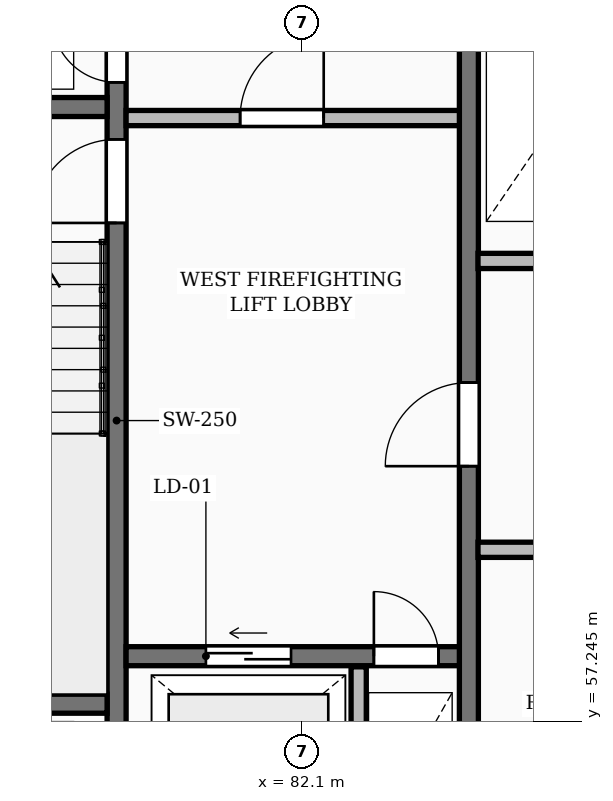
"""IFC4 building model, lengths in metres.
Left out: names, types, materials, properties, quantities, classifications, styles, units other than length and angle.
Written with IfcOpenShell. Run it as: python <this file> out.ifc"""

import sys

from ifc_helpers import new_model, si_unit, direction, frame, frame_2d, origin, place, context, subcontext, project, spatial, rectangle, extrude, element, fill, save


model = new_model("IFC4")
c1 = context("Model", 3, precision=1e-05, world=origin(), true_north=direction((0.0, 1.0)))
c2 = subcontext(c1, "Body", "Model", "MODEL_VIEW")
j1 = project(units=[si_unit("LENGTHUNIT", "METRE"), si_unit("PLANEANGLEUNIT", "RADIAN")], contexts=[c1])
p1 = place(None, origin())
s1 = spatial("IfcSite", under=j1, at=p1, CompositionType="ELEMENT")
p2 = place(p1, origin())
s2 = spatial("IfcBuilding", under=s1, at=p2, CompositionType="ELEMENT")
p3 = place(p2, frame((0.0, 0.0, 139.3)))
s3 = spatial("IfcBuildingStorey", under=s2, at=p3, CompositionType="ELEMENT", Elevation=139.3)
p4 = place(p3, frame((79.665, 55.4, 0.0), z_axis=(0.0, 0.0, 1.0), x_axis=(0.0, 1.0, 0.0)))
e1 = element("IfcWall", 1, at=p4, inside=s3, PredefinedType="SHEAR", context=c2, shape_type="SweptSolid", body=[
    extrude(rectangle(XDim=11.6, YDim=0.25, at=frame_2d((5.8, 0.0))), origin(), (0.0, 0.0, 1.0), 3.6),
])
p5 = place(p4, frame((0.55, 0.0, 0.0)))
e2 = element("IfcOpeningElement", 2, at=p5, cuts=e1, PredefinedType="OPENING", context=c2, shape_type="SweptSolid", body=[
    extrude(rectangle(XDim=0.85, YDim=2.05, at=frame_2d((0.425, 1.025))), frame((0.0, 0.135, 0.0), z_axis=(0.0, -1.0, 0.0), x_axis=(1.0, 0.0, 0.0)), (0.0, 0.0, 1.0), 0.27),
])
p6 = place(p4, frame((8.4, 0.0, 0.0)))
e3 = element("IfcOpeningElement", 3, at=p6, cuts=e1, PredefinedType="OPENING", context=c2, shape_type="SweptSolid", body=[
    extrude(rectangle(XDim=1.1, YDim=2.1, at=frame_2d((0.55, 1.05))), frame((0.0, 0.135, 0.0), z_axis=(0.0, -1.0, 0.0), x_axis=(1.0, 0.0, 0.0)), (0.0, 0.0, 1.0), 0.27),
])
p7 = place(p4, frame((10.25, 0.0, 0.0)))
e4 = element("IfcOpeningElement", 4, at=p7, cuts=e1, PredefinedType="OPENING", context=c2, shape_type="SweptSolid", body=[
    extrude(rectangle(XDim=0.85, YDim=2.05, at=frame_2d((0.425, 1.025))), frame((0.0, 0.135, 0.0), z_axis=(0.0, -1.0, 0.0), x_axis=(1.0, 0.0, 0.0)), (0.0, 0.0, 1.0), 0.27),
])
for number, where, z_axis, x_axis in (
    (5, (76.3, 57.475, 0.0), (0.0, 0.0, 1.0), (1.0, 0.0, 0.0)),
    (6, (76.3, 65.325, 0.0), (0.0, 0.0, 1.0), (1.0, 0.0, 0.0)),
):
    element("IfcWall", number, at=place(p3, frame(where, z_axis=z_axis, x_axis=x_axis)), inside=s3, PredefinedType="SHEAR", context=c2, shape_type="SweptSolid", body=[
        extrude(rectangle(XDim=3.24, YDim=0.25, at=frame_2d((1.62, 0.0))), origin(), (0.0, 0.0, 1.0), 3.6),
    ])
p8 = place(p3, frame((79.79, 58.1, 0.0), z_axis=(0.0, 0.0, 1.0), x_axis=(1.0, 0.0, 0.0)))
e7 = element("IfcWall", 7, at=p8, inside=s3, PredefinedType="SHEAR", context=c2, shape_type="SweptSolid", body=[
    extrude(rectangle(XDim=4.39, YDim=0.25, at=frame_2d((2.195, 0.0))), origin(), (0.0, 0.0, 1.0), 3.6),
])
p9 = place(p8, frame((1.05, 0.0, 0.0)))
e8 = element("IfcOpeningElement", 8, at=p9, cuts=e7, PredefinedType="OPENING", context=c2, shape_type="SweptSolid", body=[
    extrude(rectangle(XDim=1.12, YDim=2.12, at=frame_2d((0.56, 1.06))), frame((0.0, 0.135, 0.0), z_axis=(0.0, -1.0, 0.0), x_axis=(1.0, 0.0, 0.0)), (0.0, 0.0, 1.0), 0.27),
])
p10 = place(p8, frame((3.26, 0.0, 0.0)))
e9 = element("IfcOpeningElement", 9, at=p10, cuts=e7, PredefinedType="OPENING", context=c2, shape_type="SweptSolid", body=[
    extrude(rectangle(XDim=0.85, YDim=2.05, at=frame_2d((0.425, 1.025))), frame((0.0, 0.135, 0.0), z_axis=(0.0, -1.0, 0.0), x_axis=(1.0, 0.0, 0.0)), (0.0, 0.0, 1.0), 0.27),
])
p11 = place(p3, frame((82.85, 55.4, 0.0), z_axis=(0.0, 0.0, 1.0), x_axis=(0.0, 1.0, 0.0)))
e10 = element("IfcWall", 10, at=p11, inside=s3, PredefinedType="PARTITIONING", context=c2, shape_type="SweptSolid", body=[
    extrude(rectangle(XDim=2.56, YDim=0.2, at=frame_2d((1.28, 0.0))), origin(), (0.0, 0.0, 1.0), 3.31),
])
p12 = place(p3, frame((79.79, 65.18, 0.0), z_axis=(0.0, 0.0, 1.0), x_axis=(1.0, 0.0, 0.0)))
e11 = element("IfcWall", 11, at=p12, inside=s3, PredefinedType="PARTITIONING", context=c2, shape_type="SweptSolid", body=[
    extrude(rectangle(XDim=4.39, YDim=0.2, at=frame_2d((2.195, 0.0))), origin(), (0.0, 0.0, 1.0), 3.31),
])
p13 = place(p12, frame((1.5, 0.0, 0.0)))
e12 = element("IfcOpeningElement", 12, at=p13, cuts=e11, PredefinedType="OPENING", context=c2, shape_type="SweptSolid", body=[
    extrude(rectangle(XDim=1.1, YDim=2.1, at=frame_2d((0.55, 1.05))), frame((0.0, 0.11, 0.0), z_axis=(0.0, -1.0, 0.0), x_axis=(1.0, 0.0, 0.0)), (0.0, 0.0, 1.0), 0.22),
])
p14 = place(p3, frame((84.3, 55.4, 0.0), z_axis=(0.0, 0.0, 1.0), x_axis=(0.0, 1.0, 0.0)))
e13 = element("IfcWall", 13, at=p14, inside=s3, PredefinedType="SHEAR", context=c2, shape_type="SweptSolid", body=[
    extrude(rectangle(XDim=11.6, YDim=0.25, at=frame_2d((5.8, 0.0))), origin(), (0.0, 0.0, 1.0), 3.6),
])
p15 = place(p14, frame((5.2, 0.0, 0.0)))
e14 = element("IfcOpeningElement", 14, at=p15, cuts=e13, PredefinedType="OPENING", context=c2, shape_type="SweptSolid", body=[
    extrude(rectangle(XDim=1.1, YDim=2.1, at=frame_2d((0.55, 1.05))), frame((0.0, 0.135, 0.0), z_axis=(0.0, -1.0, 0.0), x_axis=(1.0, 0.0, 0.0)), (0.0, 0.0, 1.0), 0.27),
])
p16 = place(p3, frame((84.42, 59.5, 0.0), z_axis=(0.0, 0.0, 1.0), x_axis=(1.0, 0.0, 0.0)))
e15 = element("IfcWall", 15, at=p16, inside=s3, PredefinedType="PARTITIONING", context=c2, shape_type="SweptSolid", body=[
    extrude(rectangle(XDim=8.36, YDim=0.2, at=frame_2d((4.18, 0.0))), origin(), (0.0, 0.0, 1.0), 3.31),
])
p17 = place(p16, frame((2.1, 0.0, 0.0)))
e16 = element("IfcOpeningElement", 16, at=p17, cuts=e15, PredefinedType="OPENING", context=c2, shape_type="SweptSolid", body=[
    extrude(rectangle(XDim=0.92, YDim=2.08, at=frame_2d((0.46, 1.04))), frame((0.0, 0.11, 0.0), z_axis=(0.0, -1.0, 0.0), x_axis=(1.0, 0.0, 0.0)), (0.0, 0.0, 1.0), 0.22),
])
p18 = place(p16, frame((6.38, 0.0, 0.0)))
e17 = element("IfcOpeningElement", 17, at=p18, cuts=e15, PredefinedType="OPENING", context=c2, shape_type="SweptSolid", body=[
    extrude(rectangle(XDim=1.1, YDim=2.1, at=frame_2d((0.55, 1.05))), frame((0.0, 0.11, 0.0), z_axis=(0.0, -1.0, 0.0), x_axis=(1.0, 0.0, 0.0)), (0.0, 0.0, 1.0), 0.22),
])
p19 = place(p3, frame((84.42, 63.3, 0.0), z_axis=(0.0, 0.0, 1.0), x_axis=(1.0, 0.0, 0.0)))
e18 = element("IfcWall", 18, at=p19, inside=s3, PredefinedType="PARTITIONING", context=c2, shape_type="SweptSolid", body=[
    extrude(rectangle(XDim=19.83, YDim=0.2, at=frame_2d((9.915, 0.0))), origin(), (0.0, 0.0, 1.0), 3.31),
])
p20 = place(p19, frame((1.15, 0.0, 0.0)))
e19 = element("IfcOpeningElement", 19, at=p20, cuts=e18, PredefinedType="OPENING", context=c2, shape_type="SweptSolid", body=[
    extrude(rectangle(XDim=0.85, YDim=2.05, at=frame_2d((0.425, 1.025))), frame((0.0, 0.11, 0.0), z_axis=(0.0, -1.0, 0.0), x_axis=(1.0, 0.0, 0.0)), (0.0, 0.0, 1.0), 0.22),
])
p21 = place(p19, frame((3.25, 0.0, 0.0)))
e20 = element("IfcOpeningElement", 20, at=p21, cuts=e18, PredefinedType="OPENING", context=c2, shape_type="SweptSolid", body=[
    extrude(rectangle(XDim=0.85, YDim=2.05, at=frame_2d((0.425, 1.025))), frame((0.0, 0.11, 0.0), z_axis=(0.0, -1.0, 0.0), x_axis=(1.0, 0.0, 0.0)), (0.0, 0.0, 1.0), 0.22),
])
p22 = place(p19, frame((13.08, 0.0, 0.0)))
e21 = element("IfcOpeningElement", 21, at=p22, cuts=e18, PredefinedType="OPENING", context=c2, shape_type="SweptSolid", body=[
    extrude(rectangle(XDim=1.5, YDim=2.2, at=frame_2d((0.75, 1.1))), frame((0.0, 0.11, 0.0), z_axis=(0.0, -1.0, 0.0), x_axis=(1.0, 0.0, 0.0)), (0.0, 0.0, 1.0), 0.22),
])
p23 = place(p19, frame((5.53, 0.0, 0.0)))
e22 = element("IfcOpeningElement", 22, at=p23, cuts=e18, PredefinedType="OPENING", context=c2, shape_type="SweptSolid", body=[
    extrude(rectangle(XDim=0.88, YDim=2.06, at=frame_2d((0.44, 1.03))), frame((0.0, 0.11, 0.0), z_axis=(0.0, -1.0, 0.0), x_axis=(1.0, 0.0, 0.0)), (0.0, 0.0, 1.0), 0.22),
])
p24 = place(p19, frame((7.68, 0.0, 0.0)))
e23 = element("IfcOpeningElement", 23, at=p24, cuts=e18, PredefinedType="OPENING", context=c2, shape_type="SweptSolid", body=[
    extrude(rectangle(XDim=0.88, YDim=2.06, at=frame_2d((0.44, 1.03))), frame((0.0, 0.11, 0.0), z_axis=(0.0, -1.0, 0.0), x_axis=(1.0, 0.0, 0.0)), (0.0, 0.0, 1.0), 0.22),
])
p25 = place(p19, frame((10.43, 0.0, 0.0)))
e24 = element("IfcOpeningElement", 24, at=p25, cuts=e18, PredefinedType="OPENING", context=c2, shape_type="SweptSolid", body=[
    extrude(rectangle(XDim=0.85, YDim=2.05, at=frame_2d((0.425, 1.025))), frame((0.0, 0.11, 0.0), z_axis=(0.0, -1.0, 0.0), x_axis=(1.0, 0.0, 0.0)), (0.0, 0.0, 1.0), 0.22),
])
p26 = place(p19, frame((16.23, 0.0, 0.0)))
e25 = element("IfcOpeningElement", 25, at=p26, cuts=e18, PredefinedType="OPENING", context=c2, shape_type="SweptSolid", body=[
    extrude(rectangle(XDim=0.96, YDim=2.1, at=frame_2d((0.48, 1.05))), frame((0.0, 0.11, 0.0), z_axis=(0.0, -1.0, 0.0), x_axis=(1.0, 0.0, 0.0)), (0.0, 0.0, 1.0), 0.22),
])
p27 = place(p19, frame((18.68, 0.0, 0.0)))
e26 = element("IfcOpeningElement", 26, at=p27, cuts=e18, PredefinedType="OPENING", context=c2, shape_type="SweptSolid", body=[
    extrude(rectangle(XDim=0.84, YDim=2.04, at=frame_2d((0.42, 1.02))), frame((0.0, 0.11, 0.0), z_axis=(0.0, -1.0, 0.0), x_axis=(1.0, 0.0, 0.0)), (0.0, 0.0, 1.0), 0.22),
])
p28 = place(p6, origin())
e27 = element("IfcDoor", 27, at=p28, inside=s3, OperationType="SINGLE_SWING_LEFT", PredefinedType="DOOR", context=c2, shape_type="SweptSolid", body=[
    extrude(rectangle(XDim=1.1, YDim=2.1, at=frame_2d((0.55, 1.05))), frame((0.0, 0.025, 0.0), z_axis=(0.0, -1.0, 0.0), x_axis=(1.0, 0.0, 0.0)), (0.0, 0.0, 1.0), 0.05),
])
fill(e3, e27)
p29 = place(p7, origin())
e28 = element("IfcDoor", 28, at=p29, inside=s3, OperationType="SINGLE_SWING_RIGHT", PredefinedType="DOOR", context=c2, shape_type="SweptSolid", body=[
    extrude(rectangle(XDim=0.85, YDim=2.05, at=frame_2d((0.425, 1.025))), frame((0.0, 0.025, 0.0), z_axis=(0.0, -1.0, 0.0), x_axis=(1.0, 0.0, 0.0)), (0.0, 0.0, 1.0), 0.05),
])
fill(e4, e28)
p30 = place(p9, origin())
e29 = element("IfcDoor", 29, at=p30, inside=s3, OperationType="SLIDING_TO_LEFT", PredefinedType="DOOR", context=c2, shape_type="SweptSolid", body=[
    extrude(rectangle(XDim=1.12, YDim=2.12, at=frame_2d((0.56, 1.06))), frame((0.0, 0.025, 0.0), z_axis=(0.0, -1.0, 0.0), x_axis=(1.0, 0.0, 0.0)), (0.0, 0.0, 1.0), 0.05),
])
fill(e8, e29)
p31 = place(p10, origin())
e30 = element("IfcDoor", 30, at=p31, inside=s3, OperationType="SINGLE_SWING_LEFT", PredefinedType="DOOR", context=c2, shape_type="SweptSolid", body=[
    extrude(rectangle(XDim=0.85, YDim=2.05, at=frame_2d((0.425, 1.025))), frame((0.0, 0.025, 0.0), z_axis=(0.0, -1.0, 0.0), x_axis=(1.0, 0.0, 0.0)), (0.0, 0.0, 1.0), 0.05),
])
fill(e9, e30)
p32 = place(p13, origin())
e31 = element("IfcDoor", 31, at=p32, inside=s3, OperationType="SINGLE_SWING_RIGHT", PredefinedType="DOOR", context=c2, shape_type="SweptSolid", body=[
    extrude(rectangle(XDim=1.1, YDim=2.1, at=frame_2d((0.55, 1.05))), frame((0.0, 0.025, 0.0), z_axis=(0.0, -1.0, 0.0), x_axis=(1.0, 0.0, 0.0)), (0.0, 0.0, 1.0), 0.05),
])
fill(e12, e31)
p33 = place(p15, origin())
e32 = element("IfcDoor", 32, at=p33, inside=s3, OperationType="SINGLE_SWING_LEFT", PredefinedType="DOOR", context=c2, shape_type="SweptSolid", body=[
    extrude(rectangle(XDim=1.1, YDim=2.1, at=frame_2d((0.55, 1.05))), frame((0.0, 0.025, 0.0), z_axis=(0.0, -1.0, 0.0), x_axis=(1.0, 0.0, 0.0)), (0.0, 0.0, 1.0), 0.05),
])
fill(e14, e32)
save(model, sys.argv[1])
